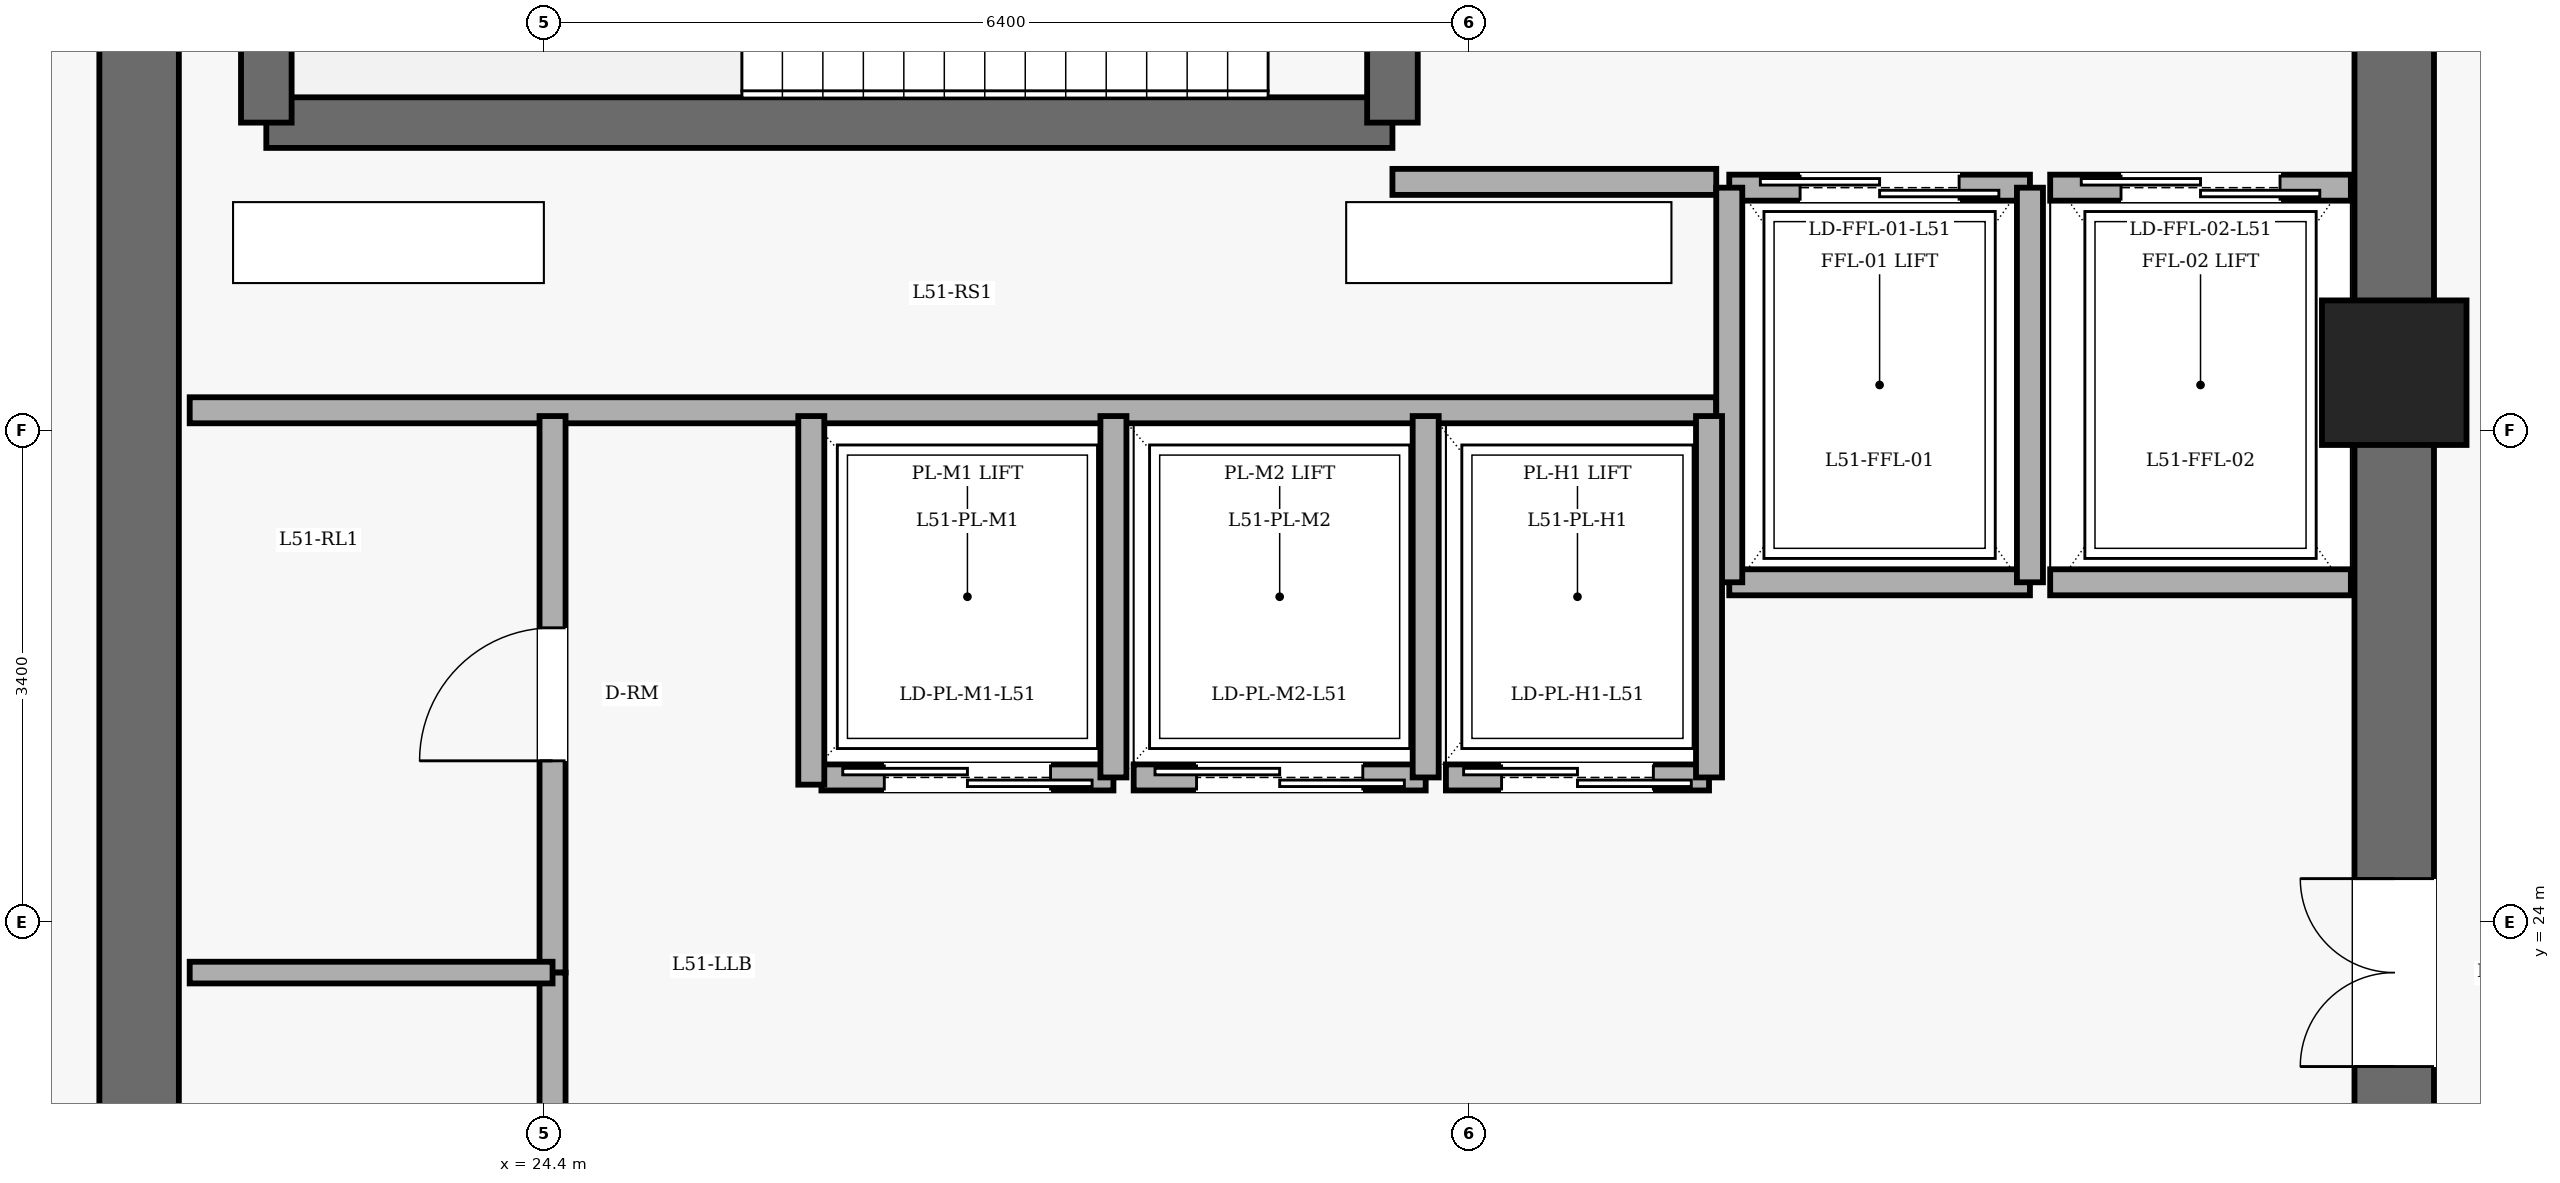
"""IFC4 building model, lengths in metres.
Left out: names, types, materials, properties, quantities, classifications, styles, units other than length and angle.
Written with IfcOpenShell. Run it as: python <this file> out.ifc"""

import sys

from ifc_helpers import new_model, si_unit, direction, frame, frame_2d, origin, origin_2d, place, context, subcontext, project, spatial, rectangle, extrude, element, fill, save


model = new_model("IFC4")
c1 = context("Model", 3, precision=1e-05, world=origin(), true_north=direction((0.0, 1.0)))
c2 = subcontext(c1, "Body", "Model", "MODEL_VIEW")
j1 = project(units=[si_unit("LENGTHUNIT", "METRE"), si_unit("PLANEANGLEUNIT", "RADIAN")], contexts=[c1])
p1 = place(None, origin())
s1 = spatial("IfcSite", under=j1, at=p1, CompositionType="ELEMENT")
p2 = place(p1, origin())
s2 = spatial("IfcBuilding", under=s1, at=p2, CompositionType="ELEMENT")
p3 = place(p2, frame((0.0, 0.0, 196.2)))
s3 = spatial("IfcBuildingStorey", under=s2, at=p3, CompositionType="ELEMENT", Elevation=196.2)
p4 = place(p3, frame((37.2, 27.8, 0.0), z_axis=(0.0, 0.0, 1.0), x_axis=(1.0, 0.0, 0.0)))
e1 = element("IfcColumn", 1, at=p4, inside=s3, PredefinedType="COLUMN", context=c2, shape_type="SweptSolid", body=[
    extrude(rectangle(XDim=1.0, YDim=1.0, at=origin_2d()), origin(), (0.0, 0.0, 1.0), 5.1),
])
p5 = place(p3, frame((21.6, 14.4, 0.0), z_axis=(0.0, 0.0, 1.0), x_axis=(0.0, 1.0, 0.0)))
e2 = element("IfcWall", 2, at=p5, inside=s3, PredefinedType="SHEAR", context=c2, shape_type="SweptSolid", body=[
    extrude(rectangle(XDim=19.2, YDim=0.55, at=frame_2d((9.6, 0.0))), origin(), (0.0, 0.0, 1.0), 4.9),
])
p6 = place(p3, frame((37.2, 14.4, 0.0), z_axis=(0.0, 0.0, 1.0), x_axis=(0.0, 1.0, 0.0)))
e3 = element("IfcWall", 3, at=p6, inside=s3, PredefinedType="SHEAR", context=c2, shape_type="SweptSolid", body=[
    extrude(rectangle(XDim=19.2, YDim=0.55, at=frame_2d((9.6, 0.0))), origin(), (0.0, 0.0, 1.0), 4.9),
])
p7 = place(p6, frame((15.8, 0.0, 0.0)))
e4 = element("IfcOpeningElement", 4, at=p7, cuts=e3, PredefinedType="OPENING", context=c2, shape_type="SweptSolid", body=[
    extrude(rectangle(XDim=1.15, YDim=2.15, at=frame_2d((0.575, 1.075))), frame((0.0, 0.285, 0.0), z_axis=(0.0, -1.0, 0.0), x_axis=(1.0, 0.0, 0.0)), (0.0, 0.0, 1.0), 0.57),
])
p8 = place(p6, frame((3.6, 0.0, 0.0)))
e5 = element("IfcOpeningElement", 5, at=p8, cuts=e3, PredefinedType="OPENING", context=c2, shape_type="SweptSolid", body=[
    extrude(rectangle(XDim=1.1, YDim=2.15, at=frame_2d((0.55, 1.075))), frame((0.0, 0.285, 0.0), z_axis=(0.0, -1.0, 0.0), x_axis=(1.0, 0.0, 0.0)), (0.0, 0.0, 1.0), 0.57),
])
p9 = place(p6, frame((8.6, 0.0, 0.0)))
e6 = element("IfcOpeningElement", 6, at=p9, cuts=e3, PredefinedType="OPENING", context=c2, shape_type="SweptSolid", body=[
    extrude(rectangle(XDim=1.3, YDim=2.2, at=frame_2d((0.65, 1.1))), frame((0.0, 0.285, 0.0), z_axis=(0.0, -1.0, 0.0), x_axis=(1.0, 0.0, 0.0)), (0.0, 0.0, 1.0), 0.57),
])
p10 = place(p3, frame((22.48, 29.53, 0.0), z_axis=(0.0, 0.0, 1.0), x_axis=(1.0, 0.0, 0.0)))
e7 = element("IfcWall", 7, at=p10, inside=s3, PredefinedType="SOLIDWALL", context=c2, shape_type="SweptSolid", body=[
    extrude(rectangle(XDim=7.79, YDim=0.35, at=frame_2d((3.895, 0.0))), origin(), (0.0, 0.0, 1.0), 4.9),
])
p11 = place(p3, frame((22.48, 29.53, 0.0), z_axis=(0.0, 0.0, 1.0), x_axis=(0.0, 1.0, 0.0)))
e8 = element("IfcWall", 8, at=p11, inside=s3, PredefinedType="SOLIDWALL", context=c2, shape_type="SweptSolid", body=[
    extrude(rectangle(XDim=3.58, YDim=0.35, at=frame_2d((1.79, 0.0))), origin(), (0.0, 0.0, 1.0), 4.9),
])
p12 = place(p3, frame((30.27, 29.53, 0.0), z_axis=(0.0, 0.0, 1.0), x_axis=(0.0, 1.0, 0.0)))
e9 = element("IfcWall", 9, at=p12, inside=s3, PredefinedType="SOLIDWALL", context=c2, shape_type="SweptSolid", body=[
    extrude(rectangle(XDim=3.58, YDim=0.35, at=frame_2d((1.79, 0.0))), origin(), (0.0, 0.0, 1.0), 4.9),
])
p13 = place(p12, frame((1.25, 0.0, 0.0)))
e10 = element("IfcOpeningElement", 10, at=p13, cuts=e9, PredefinedType="OPENING", context=c2, shape_type="SweptSolid", body=[
    extrude(rectangle(XDim=1.1, YDim=2.15, at=frame_2d((0.55, 1.075))), frame((0.0, 0.185, 0.0), z_axis=(0.0, -1.0, 0.0), x_axis=(1.0, 0.0, 0.0)), (0.0, 0.0, 1.0), 0.37),
])
p14 = place(p3, frame((30.27, 29.12, 0.0), z_axis=(0.0, 0.0, 1.0), x_axis=(1.0, 0.0, 0.0)))
e11 = element("IfcWall", 11, at=p14, inside=s3, PredefinedType="PARTITIONING", context=c2, shape_type="SweptSolid", body=[
    extrude(rectangle(XDim=2.24, YDim=0.18, at=frame_2d((1.12, 0.0))), origin(), (0.0, 0.0, 1.0), 4.9),
])
p15 = place(p3, frame((21.95, 27.54, 0.0), z_axis=(0.0, 0.0, 1.0), x_axis=(1.0, 0.0, 0.0)))
e12 = element("IfcWall", 12, at=p15, inside=s3, PredefinedType="PARTITIONING", context=c2, shape_type="SweptSolid", body=[
    extrude(rectangle(XDim=10.56, YDim=0.18, at=frame_2d((5.28, 0.0))), origin(), (0.0, 0.0, 1.0), 4.9),
])
p16 = place(p3, frame((32.6, 29.08, 0.0), z_axis=(0.0, 0.0, 1.0), x_axis=(1.0, 0.0, 0.0)))
e13 = element("IfcWall", 13, at=p16, inside=s3, PredefinedType="PARTITIONING", context=c2, shape_type="SweptSolid", body=[
    extrude(rectangle(XDim=2.08, YDim=0.18, at=frame_2d((1.04, 0.0))), origin(), (0.0, 0.0, 1.0), 4.9),
])
p17 = place(p16, frame((0.49, 0.0, 0.0)))
e14 = element("IfcOpeningElement", 14, at=p17, cuts=e13, PredefinedType="OPENING", context=c2, shape_type="SweptSolid", body=[
    extrude(rectangle(XDim=1.1, YDim=2.2, at=frame_2d((0.55, 1.1))), frame((0.0, 0.1, 0.0), z_axis=(0.0, -1.0, 0.0), x_axis=(1.0, 0.0, 0.0)), (0.0, 0.0, 1.0), 0.2),
])
p18 = place(p3, frame((34.68, 26.35, 0.0), z_axis=(0.0, 0.0, 1.0), x_axis=(-1.0, 0.0, 0.0)))
e15 = element("IfcWall", 15, at=p18, inside=s3, PredefinedType="PARTITIONING", context=c2, shape_type="SweptSolid", body=[
    extrude(rectangle(XDim=2.08, YDim=0.18, at=frame_2d((1.04, 0.0))), origin(), (0.0, 0.0, 1.0), 4.9),
])
for number, where, z_axis, x_axis in (
    (16, (34.68, 26.35, 0.0), (0.0, 0.0, 1.0), (0.0, 1.0, 0.0)),
    (17, (32.6, 29.08, 0.0), (0.0, 0.0, 1.0), (0.0, -1.0, 0.0)),
):
    element("IfcWall", number, at=place(p3, frame(where, z_axis=z_axis, x_axis=x_axis)), inside=s3, PredefinedType="PARTITIONING", context=c2, shape_type="SweptSolid", body=[
        extrude(rectangle(XDim=2.73, YDim=0.18, at=frame_2d((1.365, 0.0))), origin(), (0.0, 0.0, 1.0), 4.9),
    ])
p19 = place(p3, frame((34.82, 29.08, 0.0), z_axis=(0.0, 0.0, 1.0), x_axis=(1.0, 0.0, 0.0)))
e18 = element("IfcWall", 18, at=p19, inside=s3, PredefinedType="PARTITIONING", context=c2, shape_type="SweptSolid", body=[
    extrude(rectangle(XDim=2.08, YDim=0.18, at=frame_2d((1.04, 0.0))), origin(), (0.0, 0.0, 1.0), 4.9),
])
p20 = place(p19, frame((0.49, 0.0, 0.0)))
e19 = element("IfcOpeningElement", 19, at=p20, cuts=e18, PredefinedType="OPENING", context=c2, shape_type="SweptSolid", body=[
    extrude(rectangle(XDim=1.1, YDim=2.2, at=frame_2d((0.55, 1.1))), frame((0.0, 0.1, 0.0), z_axis=(0.0, -1.0, 0.0), x_axis=(1.0, 0.0, 0.0)), (0.0, 0.0, 1.0), 0.2),
])
p21 = place(p3, frame((36.9, 26.35, 0.0), z_axis=(0.0, 0.0, 1.0), x_axis=(-1.0, 0.0, 0.0)))
e20 = element("IfcWall", 20, at=p21, inside=s3, PredefinedType="PARTITIONING", context=c2, shape_type="SweptSolid", body=[
    extrude(rectangle(XDim=2.08, YDim=0.18, at=frame_2d((1.04, 0.0))), origin(), (0.0, 0.0, 1.0), 4.9),
])
p22 = place(p3, frame((28.34, 25.0, 0.0), z_axis=(0.0, 0.0, 1.0), x_axis=(-1.0, 0.0, 0.0)))
e21 = element("IfcWall", 21, at=p22, inside=s3, PredefinedType="PARTITIONING", context=c2, shape_type="SweptSolid", body=[
    extrude(rectangle(XDim=2.02, YDim=0.18, at=frame_2d((1.01, 0.0))), origin(), (0.0, 0.0, 1.0), 4.9),
])
p23 = place(p22, frame((0.435, 0.0, 0.0)))
e22 = element("IfcOpeningElement", 22, at=p23, cuts=e21, PredefinedType="OPENING", context=c2, shape_type="SweptSolid", body=[
    extrude(rectangle(XDim=1.15, YDim=2.2, at=frame_2d((0.575, 1.1))), frame((0.0, 0.1, 0.0), z_axis=(0.0, -1.0, 0.0), x_axis=(1.0, 0.0, 0.0)), (0.0, 0.0, 1.0), 0.2),
])
p24 = place(p3, frame((28.34, 25.0, 0.0), z_axis=(0.0, 0.0, 1.0), x_axis=(0.0, 1.0, 0.0)))
e23 = element("IfcWall", 23, at=p24, inside=s3, PredefinedType="PARTITIONING", context=c2, shape_type="SweptSolid", body=[
    extrude(rectangle(XDim=2.5, YDim=0.18, at=frame_2d((1.25, 0.0))), origin(), (0.0, 0.0, 1.0), 4.9),
])
p25 = place(p3, frame((30.5, 25.0, 0.0), z_axis=(0.0, 0.0, 1.0), x_axis=(-1.0, 0.0, 0.0)))
e24 = element("IfcWall", 24, at=p25, inside=s3, PredefinedType="PARTITIONING", context=c2, shape_type="SweptSolid", body=[
    extrude(rectangle(XDim=2.02, YDim=0.18, at=frame_2d((1.01, 0.0))), origin(), (0.0, 0.0, 1.0), 4.9),
])
p26 = place(p25, frame((0.435, 0.0, 0.0)))
e25 = element("IfcOpeningElement", 25, at=p26, cuts=e24, PredefinedType="OPENING", context=c2, shape_type="SweptSolid", body=[
    extrude(rectangle(XDim=1.15, YDim=2.2, at=frame_2d((0.575, 1.1))), frame((0.0, 0.1, 0.0), z_axis=(0.0, -1.0, 0.0), x_axis=(1.0, 0.0, 0.0)), (0.0, 0.0, 1.0), 0.2),
])
p27 = place(p3, frame((30.5, 25.0, 0.0), z_axis=(0.0, 0.0, 1.0), x_axis=(0.0, 1.0, 0.0)))
e26 = element("IfcWall", 26, at=p27, inside=s3, PredefinedType="PARTITIONING", context=c2, shape_type="SweptSolid", body=[
    extrude(rectangle(XDim=2.5, YDim=0.18, at=frame_2d((1.25, 0.0))), origin(), (0.0, 0.0, 1.0), 4.9),
])
p28 = place(p3, frame((32.46, 25.0, 0.0), z_axis=(0.0, 0.0, 1.0), x_axis=(-1.0, 0.0, 0.0)))
e27 = element("IfcWall", 27, at=p28, inside=s3, PredefinedType="PARTITIONING", context=c2, shape_type="SweptSolid", body=[
    extrude(rectangle(XDim=1.82, YDim=0.18, at=frame_2d((0.91, 0.0))), origin(), (0.0, 0.0, 1.0), 4.9),
])
p29 = place(p28, frame((0.385, 0.0, 0.0)))
e28 = element("IfcOpeningElement", 28, at=p29, cuts=e27, PredefinedType="OPENING", context=c2, shape_type="SweptSolid", body=[
    extrude(rectangle(XDim=1.05, YDim=2.2, at=frame_2d((0.525, 1.1))), frame((0.0, 0.1, 0.0), z_axis=(0.0, -1.0, 0.0), x_axis=(1.0, 0.0, 0.0)), (0.0, 0.0, 1.0), 0.2),
])
p30 = place(p3, frame((32.46, 25.0, 0.0), z_axis=(0.0, 0.0, 1.0), x_axis=(0.0, 1.0, 0.0)))
e29 = element("IfcWall", 29, at=p30, inside=s3, PredefinedType="PARTITIONING", context=c2, shape_type="SweptSolid", body=[
    extrude(rectangle(XDim=2.5, YDim=0.18, at=frame_2d((1.25, 0.0))), origin(), (0.0, 0.0, 1.0), 4.9),
])
p31 = place(p3, frame((24.46, 23.65, 0.0), z_axis=(0.0, 0.0, 1.0), x_axis=(0.0, 1.0, 0.0)))
e30 = element("IfcWall", 30, at=p31, inside=s3, PredefinedType="PARTITIONING", context=c2, shape_type="SweptSolid", body=[
    extrude(rectangle(XDim=3.85, YDim=0.18, at=frame_2d((1.925, 0.0))), origin(), (0.0, 0.0, 1.0), 4.9),
])
p32 = place(p31, frame((1.465, 0.0, 0.0)))
e31 = element("IfcOpeningElement", 31, at=p32, cuts=e30, PredefinedType="OPENING", context=c2, shape_type="SweptSolid", body=[
    extrude(rectangle(XDim=0.92, YDim=2.1, at=frame_2d((0.46, 1.05))), frame((0.0, 0.1, 0.0), z_axis=(0.0, -1.0, 0.0), x_axis=(1.0, 0.0, 0.0)), (0.0, 0.0, 1.0), 0.2),
])
p33 = place(p3, frame((24.46, 19.8, 0.0), z_axis=(0.0, 0.0, 1.0), x_axis=(0.0, 1.0, 0.0)))
e32 = element("IfcWall", 32, at=p33, inside=s3, PredefinedType="PARTITIONING", context=c2, shape_type="SweptSolid", body=[
    extrude(rectangle(XDim=3.85, YDim=0.18, at=frame_2d((1.925, 0.0))), origin(), (0.0, 0.0, 1.0), 4.9),
])
p34 = place(p33, frame((1.465, 0.0, 0.0)))
e33 = element("IfcOpeningElement", 33, at=p34, cuts=e32, PredefinedType="OPENING", context=c2, shape_type="SweptSolid", body=[
    extrude(rectangle(XDim=0.92, YDim=2.1, at=frame_2d((0.46, 1.05))), frame((0.0, 0.1, 0.0), z_axis=(0.0, -1.0, 0.0), x_axis=(1.0, 0.0, 0.0)), (0.0, 0.0, 1.0), 0.2),
])
p35 = place(p3, frame((21.95, 23.65, 0.0), z_axis=(0.0, 0.0, 1.0), x_axis=(1.0, 0.0, 0.0)))
e34 = element("IfcWall", 34, at=p35, inside=s3, PredefinedType="PARTITIONING", context=c2, shape_type="SweptSolid", body=[
    extrude(rectangle(XDim=2.51, YDim=0.15, at=frame_2d((1.255, 0.0))), origin(), (0.0, 0.0, 1.0), 4.9),
])
p36 = place(p3, frame((26.25, 24.95, 0.0), z_axis=(0.0, 0.0, 1.0), x_axis=(0.0, 1.0, 0.0)))
e35 = element("IfcWall", 35, at=p36, inside=s3, PredefinedType="PARTITIONING", context=c2, shape_type="SweptSolid", body=[
    extrude(rectangle(XDim=2.55, YDim=0.18, at=frame_2d((1.275, 0.0))), origin(), (0.0, 0.0, 1.0), 4.9),
])
p37 = place(p17, origin())
e36 = element("IfcDoor", 36, at=p37, inside=s3, OperationType="DOUBLE_DOOR_SLIDING", PredefinedType="DOOR", context=c2, shape_type="SweptSolid", body=[
    extrude(rectangle(XDim=1.1, YDim=2.2, at=frame_2d((0.55, 1.1))), frame((0.0, 0.025, 0.0), z_axis=(0.0, -1.0, 0.0), x_axis=(1.0, 0.0, 0.0)), (0.0, 0.0, 1.0), 0.05),
])
fill(e14, e36)
p38 = place(p20, origin())
e37 = element("IfcDoor", 37, at=p38, inside=s3, OperationType="DOUBLE_DOOR_SLIDING", PredefinedType="DOOR", context=c2, shape_type="SweptSolid", body=[
    extrude(rectangle(XDim=1.1, YDim=2.2, at=frame_2d((0.55, 1.1))), frame((0.0, 0.025, 0.0), z_axis=(0.0, -1.0, 0.0), x_axis=(1.0, 0.0, 0.0)), (0.0, 0.0, 1.0), 0.05),
])
fill(e19, e37)
p39 = place(p23, origin())
e38 = element("IfcDoor", 38, at=p39, inside=s3, OperationType="DOUBLE_DOOR_SLIDING", PredefinedType="DOOR", context=c2, shape_type="SweptSolid", body=[
    extrude(rectangle(XDim=1.15, YDim=2.2, at=frame_2d((0.575, 1.1))), frame((0.0, 0.025, 0.0), z_axis=(0.0, -1.0, 0.0), x_axis=(1.0, 0.0, 0.0)), (0.0, 0.0, 1.0), 0.05),
])
fill(e22, e38)
p40 = place(p26, origin())
e39 = element("IfcDoor", 39, at=p40, inside=s3, OperationType="DOUBLE_DOOR_SLIDING", PredefinedType="DOOR", context=c2, shape_type="SweptSolid", body=[
    extrude(rectangle(XDim=1.15, YDim=2.2, at=frame_2d((0.575, 1.1))), frame((0.0, 0.025, 0.0), z_axis=(0.0, -1.0, 0.0), x_axis=(1.0, 0.0, 0.0)), (0.0, 0.0, 1.0), 0.05),
])
fill(e25, e39)
p41 = place(p29, origin())
e40 = element("IfcDoor", 40, at=p41, inside=s3, OperationType="DOUBLE_DOOR_SLIDING", PredefinedType="DOOR", context=c2, shape_type="SweptSolid", body=[
    extrude(rectangle(XDim=1.05, YDim=2.2, at=frame_2d((0.525, 1.1))), frame((0.0, 0.025, 0.0), z_axis=(0.0, -1.0, 0.0), x_axis=(1.0, 0.0, 0.0)), (0.0, 0.0, 1.0), 0.05),
])
fill(e28, e40)
p42 = place(p32, origin())
e41 = element("IfcDoor", 41, at=p42, inside=s3, OperationType="SINGLE_SWING_LEFT", PredefinedType="DOOR", context=c2, shape_type="SweptSolid", body=[
    extrude(rectangle(XDim=0.92, YDim=2.1, at=frame_2d((0.46, 1.05))), frame((0.0, 0.025, 0.0), z_axis=(0.0, -1.0, 0.0), x_axis=(1.0, 0.0, 0.0)), (0.0, 0.0, 1.0), 0.05),
])
fill(e31, e41)
p43 = place(p9, origin())
e42 = element("IfcDoor", 42, at=p43, inside=s3, OperationType="DOUBLE_DOOR_SINGLE_SWING", PredefinedType="DOOR", context=c2, shape_type="SweptSolid", body=[
    extrude(rectangle(XDim=1.3, YDim=2.2, at=frame_2d((0.65, 1.1))), frame((0.0, 0.025, 0.0), z_axis=(0.0, -1.0, 0.0), x_axis=(1.0, 0.0, 0.0)), (0.0, 0.0, 1.0), 0.05),
])
fill(e6, e42)
save(model, sys.argv[1])
